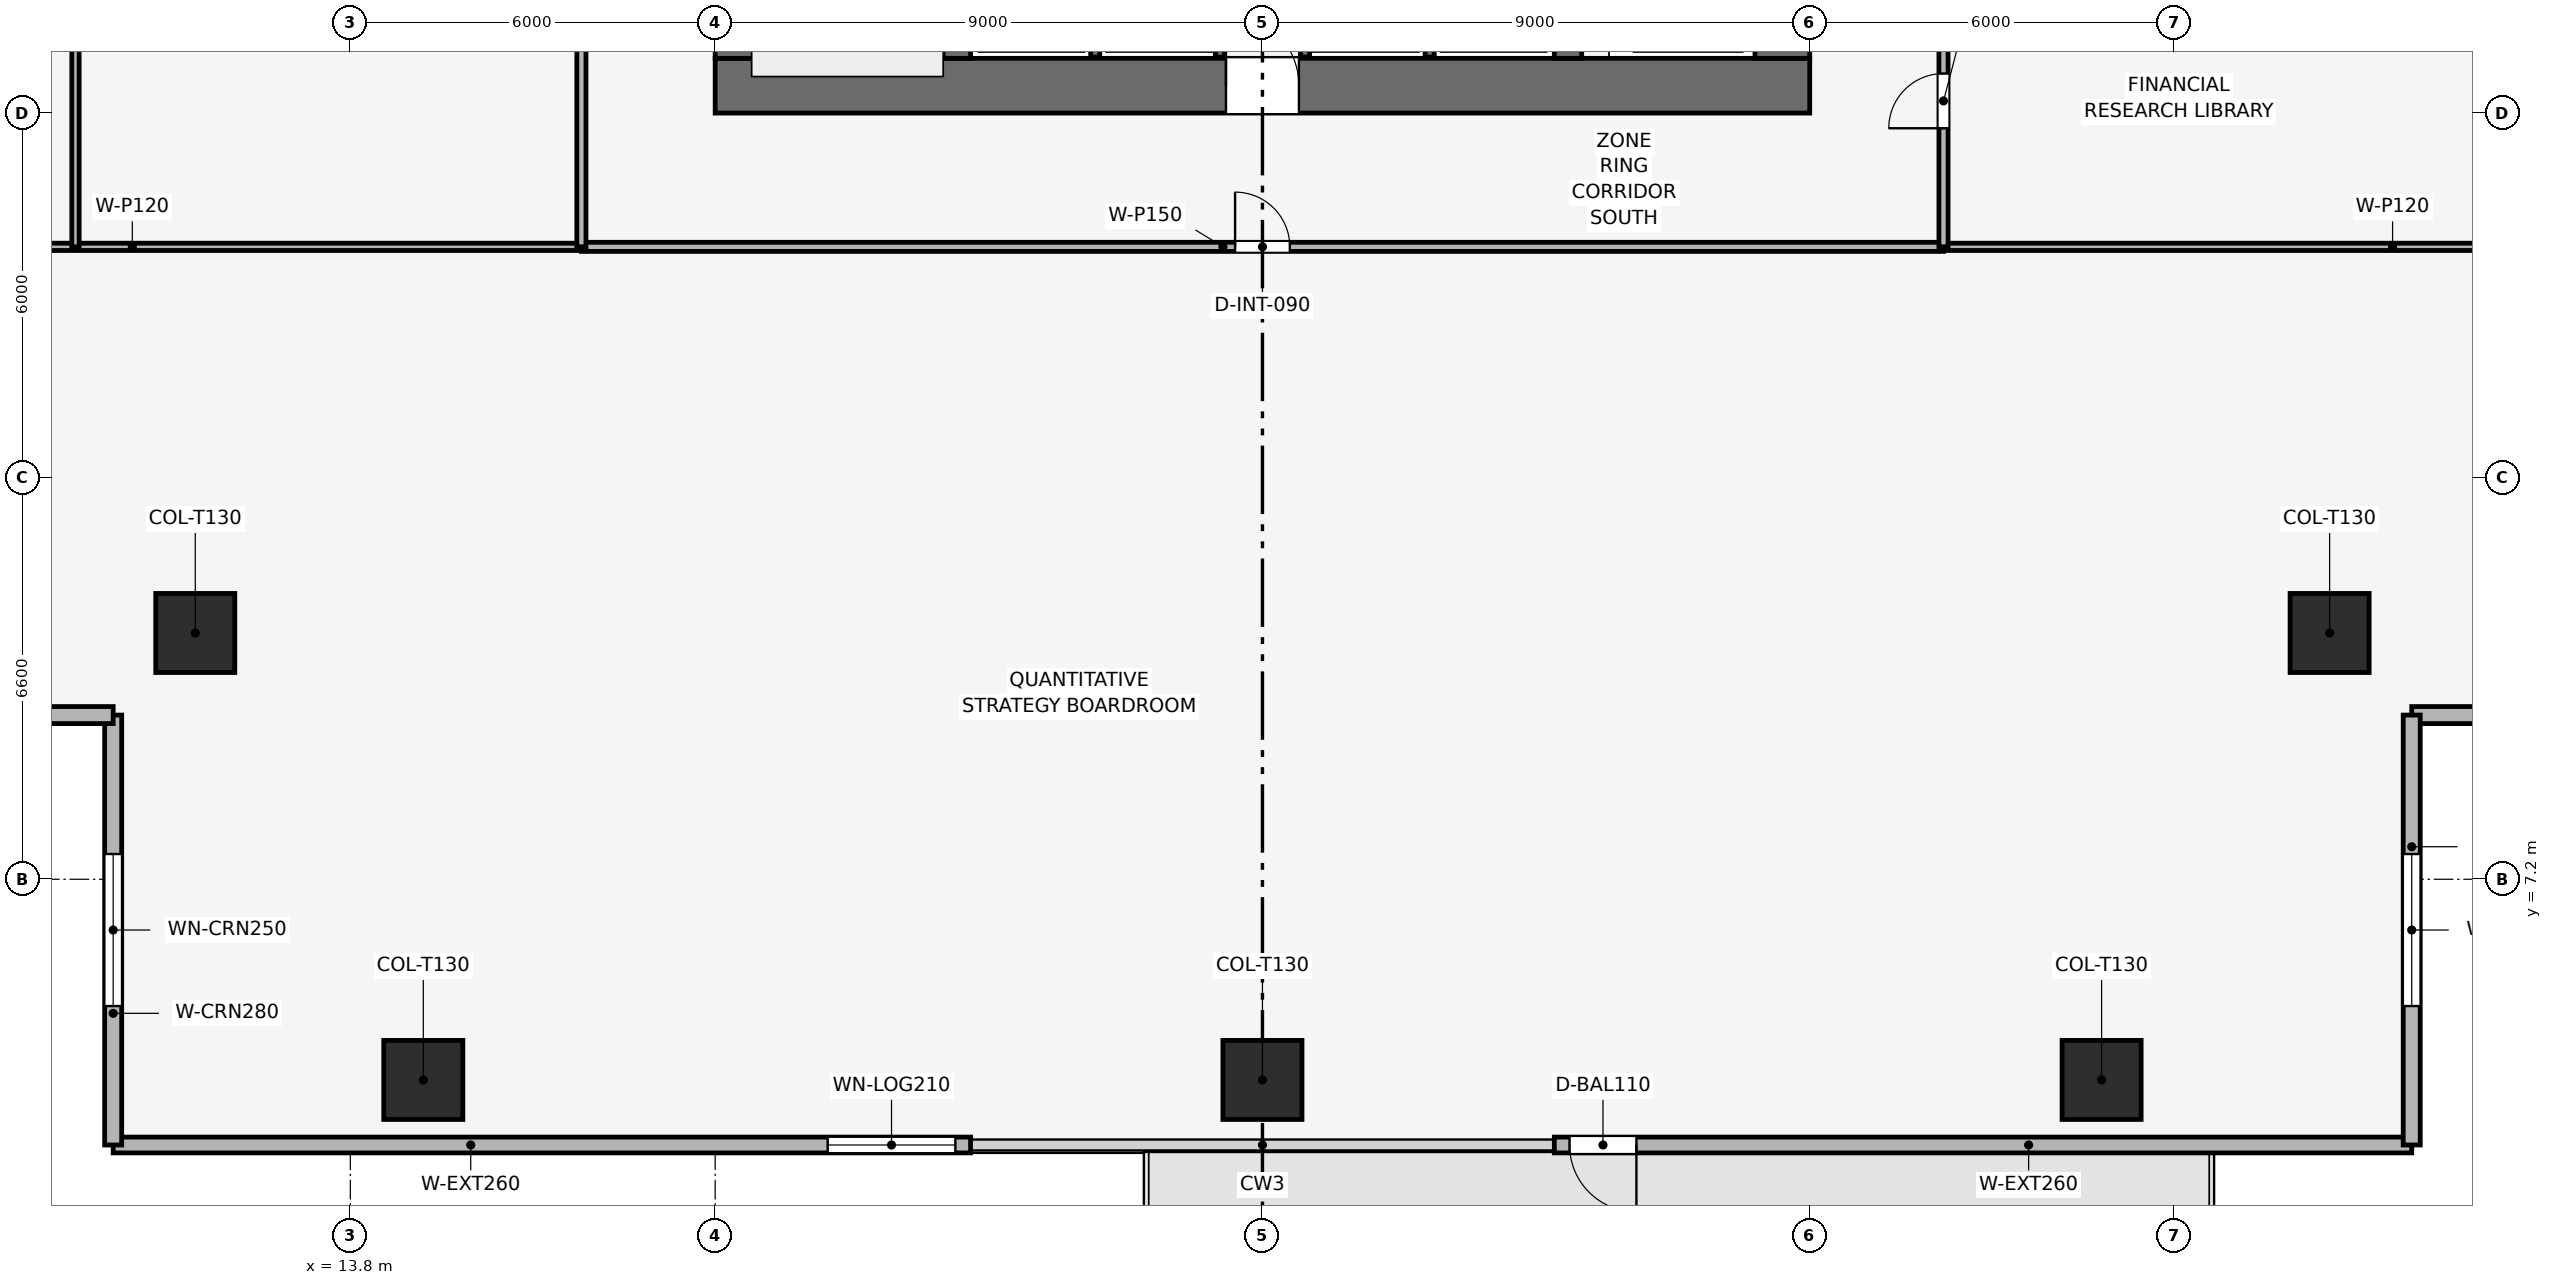
"""IFC4 building model, lengths in metres.
Left out: names, types, materials, properties, quantities, classifications, styles, units other than length and angle.
Written with IfcOpenShell. Run it as: python <this file> out.ifc"""

import sys

from ifc_helpers import new_model, si_unit, direction, frame, frame_2d, origin, origin_2d, place, context, subcontext, project, spatial, rectangle, extrude, element, fill, save


model = new_model("IFC4")
c1 = context("Model", 3, precision=1e-05, world=origin(), true_north=direction((0.0, 1.0)))
c2 = subcontext(c1, "Body", "Model", "MODEL_VIEW")
j1 = project(units=[si_unit("LENGTHUNIT", "METRE"), si_unit("PLANEANGLEUNIT", "RADIAN")], contexts=[c1])
p1 = place(None, origin())
s1 = spatial("IfcSite", under=j1, at=p1, CompositionType="ELEMENT")
p2 = place(p1, origin())
s2 = spatial("IfcBuilding", under=s1, at=p2, CompositionType="ELEMENT")
p3 = place(p2, frame((0.0, 0.0, 129.0)))
s3 = spatial("IfcBuildingStorey", under=s2, at=p3, CompositionType="ELEMENT", Elevation=129.0)
p4 = place(p3, frame((19.8, 20.25, 0.0), z_axis=(0.0, 0.0, 1.0), x_axis=(1.0, 0.0, 0.0)))
e1 = element("IfcWall", 1, at=p4, inside=s3, PredefinedType="SHEAR", context=c2, shape_type="SweptSolid", body=[
    extrude(rectangle(XDim=18.0, YDim=0.9, at=frame_2d((9.0, 0.0))), origin(), (0.0, 0.0, 1.0), 3.9),
])
p5 = place(p4, frame((8.4, 0.0, 0.0)))
e2 = element("IfcOpeningElement", 2, at=p5, cuts=e1, PredefinedType="OPENING", context=c2, shape_type="SweptSolid", body=[
    extrude(rectangle(XDim=1.2, YDim=2.2, at=frame_2d((0.6, 1.1))), frame((0.0, 0.46, 0.0), z_axis=(0.0, -1.0, 0.0), x_axis=(1.0, 0.0, 0.0)), (0.0, 0.0, 1.0), 0.92),
])
p6 = place(p3, frame((20.25, 20.7, 0.0), z_axis=(0.0, 0.0, 1.0), x_axis=(0.0, 1.0, 0.0)))
e3 = element("IfcWall", 3, at=p6, inside=s3, PredefinedType="SHEAR", context=c2, shape_type="SweptSolid", body=[
    extrude(rectangle(XDim=16.2, YDim=0.9, at=frame_2d((8.1, 0.0))), origin(), (0.0, 0.0, 1.0), 3.9),
])
p7 = place(p6, frame((10.1, 0.0, 0.0)))
e4 = element("IfcOpeningElement", 4, at=p7, cuts=e3, PredefinedType="OPENING", context=c2, shape_type="SweptSolid", body=[
    extrude(rectangle(XDim=1.1, YDim=2.15, at=frame_2d((0.55, 1.075))), frame((0.0, 0.46, 0.0), z_axis=(0.0, -1.0, 0.0), x_axis=(1.0, 0.0, 0.0)), (0.0, 0.0, 1.0), 0.92),
])
p8 = place(p3, frame((37.35, 20.7, 0.0), z_axis=(0.0, 0.0, 1.0), x_axis=(0.0, 1.0, 0.0)))
e5 = element("IfcWall", 5, at=p8, inside=s3, PredefinedType="SHEAR", context=c2, shape_type="SweptSolid", body=[
    extrude(rectangle(XDim=16.2, YDim=0.9, at=frame_2d((8.1, 0.0))), origin(), (0.0, 0.0, 1.0), 3.9),
])
p9 = place(p8, frame((4.6, 0.0, 0.0)))
e6 = element("IfcOpeningElement", 6, at=p9, cuts=e5, PredefinedType="OPENING", context=c2, shape_type="SweptSolid", body=[
    extrude(rectangle(XDim=1.1, YDim=2.15, at=frame_2d((0.55, 1.075))), frame((0.0, 0.46, 0.0), z_axis=(0.0, -1.0, 0.0), x_axis=(1.0, 0.0, 0.0)), (0.0, 0.0, 1.0), 0.92),
])
for number, where, z_axis, x_axis in (
    (7, (23.775, 20.7, 0.0), (0.0, 0.0, 1.0), (0.0, 1.0, 0.0)),
    (8, (33.825, 20.7, 0.0), (0.0, 0.0, 1.0), (0.0, 1.0, 0.0)),
):
    element("IfcWall", number, at=place(p3, frame(where, z_axis=z_axis, x_axis=x_axis)), inside=s3, PredefinedType="SHEAR", context=c2, shape_type="SweptSolid", body=[
        extrude(rectangle(XDim=16.2, YDim=0.45, at=frame_2d((8.1, 0.0))), origin(), (0.0, 0.0, 1.0), 3.9),
    ])
for number, where, z_axis, x_axis in (
    (9, (15.0, 3.9, 0.003), (0.0, 0.0, 1.0), (1.0, 0.0, 0.0)),
    (10, (28.8, 3.9, 0.003), (0.0, 0.0, 1.0), (1.0, 0.0, 0.0)),
    (11, (42.6, 3.9, 0.003), (0.0, 0.0, 1.0), (1.0, 0.0, 0.0)),
    (12, (11.25, 11.25, 0.003), (0.0, 0.0, 1.0), (1.0, 0.0, 0.0)),
    (13, (46.35, 11.25, 0.003), (0.0, 0.0, 1.0), (1.0, 0.0, 0.0)),
):
    element("IfcColumn", number, at=place(p3, frame(where, z_axis=z_axis, x_axis=x_axis)), inside=s3, PredefinedType="COLUMN", context=c2, shape_type="SweptSolid", body=[
        extrude(rectangle(XDim=1.3, YDim=1.3, at=origin_2d()), origin(), (0.0, 0.0, 1.0), 3.644),
    ])
p10 = place(p3, frame((47.7, 2.83, 0.0), z_axis=(0.0, 0.0, 1.0), x_axis=(-1.0, 0.0, 0.0)))
e14 = element("IfcWall", 14, at=p10, inside=s3, PredefinedType="SOLIDWALL", context=c2, shape_type="SweptSolid", body=[
    extrude(rectangle(XDim=14.1, YDim=0.26, at=frame_2d((7.05, 0.0))), origin(), (0.0, 0.0, 1.0), 3.65),
])
p11 = place(p10, frame((12.75, 0.0, 0.0)))
e15 = element("IfcOpeningElement", 15, at=p11, cuts=e14, PredefinedType="OPENING", context=c2, shape_type="SweptSolid", body=[
    extrude(rectangle(XDim=1.1, YDim=2.2, at=frame_2d((0.55, 1.1))), frame((0.0, 0.14, 0.0), z_axis=(0.0, -1.0, 0.0), x_axis=(1.0, 0.0, 0.0)), (0.0, 0.0, 1.0), 0.28),
])
p12 = place(p3, frame((24.0, 2.83, 0.0), z_axis=(0.0, 0.0, 1.0), x_axis=(-1.0, 0.0, 0.0)))
e16 = element("IfcWall", 16, at=p12, inside=s3, PredefinedType="SOLIDWALL", context=c2, shape_type="SweptSolid", body=[
    extrude(rectangle(XDim=14.1, YDim=0.26, at=frame_2d((7.05, 0.0))), origin(), (0.0, 0.0, 1.0), 3.65),
])
p13 = place(p12, frame((0.25, 0.0, 0.72)))
e17 = element("IfcOpeningElement", 17, at=p13, cuts=e16, PredefinedType="OPENING", context=c2, shape_type="SweptSolid", body=[
    extrude(rectangle(XDim=2.1, YDim=2.1, at=frame_2d((1.05, 1.05))), frame((0.0, 0.14, 0.0), z_axis=(0.0, -1.0, 0.0), x_axis=(1.0, 0.0, 0.0)), (0.0, 0.0, 1.0), 0.28),
])
p14 = place(p3, frame((9.9, 2.83, 0.0), z_axis=(0.0, 0.0, 1.0), x_axis=(0.0, 1.0, 0.0)))
e18 = element("IfcWall", 18, at=p14, inside=s3, PredefinedType="SOLIDWALL", context=c2, shape_type="SweptSolid", body=[
    extrude(rectangle(XDim=7.07, YDim=0.28, at=frame_2d((3.535, 0.0))), origin(), (0.0, 0.0, 1.0), 3.65),
])
p15 = place(p14, frame((2.285, 0.0, 0.72)))
e19 = element("IfcOpeningElement", 19, at=p15, cuts=e18, PredefinedType="OPENING", context=c2, shape_type="SweptSolid", body=[
    extrude(rectangle(XDim=2.5, YDim=1.9, at=frame_2d((1.25, 0.95))), frame((0.0, 0.15, 0.0), z_axis=(0.0, -1.0, 0.0), x_axis=(1.0, 0.0, 0.0)), (0.0, 0.0, 1.0), 0.3),
])
p16 = place(p3, frame((9.9, 9.9, 0.0), z_axis=(0.0, 0.0, 1.0), x_axis=(-1.0, 0.0, 0.0)))
e20 = element("IfcWall", 20, at=p16, inside=s3, PredefinedType="SOLIDWALL", context=c2, shape_type="SweptSolid", body=[
    extrude(rectangle(XDim=7.07, YDim=0.28, at=frame_2d((3.535, 0.0))), origin(), (0.0, 0.0, 1.0), 3.65),
])
p17 = place(p16, frame((2.285, 0.0, 0.72)))
e21 = element("IfcOpeningElement", 21, at=p17, cuts=e20, PredefinedType="OPENING", context=c2, shape_type="SweptSolid", body=[
    extrude(rectangle(XDim=2.5, YDim=1.9, at=frame_2d((1.25, 0.95))), frame((0.0, 0.15, 0.0), z_axis=(0.0, -1.0, 0.0), x_axis=(1.0, 0.0, 0.0)), (0.0, 0.0, 1.0), 0.3),
])
p18 = place(p3, frame((54.77, 9.9, 0.0), z_axis=(0.0, 0.0, 1.0), x_axis=(-1.0, 0.0, 0.0)))
e22 = element("IfcWall", 22, at=p18, inside=s3, PredefinedType="SOLIDWALL", context=c2, shape_type="SweptSolid", body=[
    extrude(rectangle(XDim=7.07, YDim=0.28, at=frame_2d((3.535, 0.0))), origin(), (0.0, 0.0, 1.0), 3.65),
])
p19 = place(p18, frame((2.285, 0.0, 0.72)))
e23 = element("IfcOpeningElement", 23, at=p19, cuts=e22, PredefinedType="OPENING", context=c2, shape_type="SweptSolid", body=[
    extrude(rectangle(XDim=2.5, YDim=1.9, at=frame_2d((1.25, 0.95))), frame((0.0, 0.15, 0.0), z_axis=(0.0, -1.0, 0.0), x_axis=(1.0, 0.0, 0.0)), (0.0, 0.0, 1.0), 0.3),
])
p20 = place(p3, frame((47.7, 9.9, 0.0), z_axis=(0.0, 0.0, 1.0), x_axis=(0.0, -1.0, 0.0)))
e24 = element("IfcWall", 24, at=p20, inside=s3, PredefinedType="SOLIDWALL", context=c2, shape_type="SweptSolid", body=[
    extrude(rectangle(XDim=7.07, YDim=0.28, at=frame_2d((3.535, 0.0))), origin(), (0.0, 0.0, 1.0), 3.65),
])
p21 = place(p20, frame((2.285, 0.0, 0.72)))
e25 = element("IfcOpeningElement", 25, at=p21, cuts=e24, PredefinedType="OPENING", context=c2, shape_type="SweptSolid", body=[
    extrude(rectangle(XDim=2.5, YDim=1.9, at=frame_2d((1.25, 0.95))), frame((0.0, 0.15, 0.0), z_axis=(0.0, -1.0, 0.0), x_axis=(1.0, 0.0, 0.0)), (0.0, 0.0, 1.0), 0.3),
])
for number, where, z_axis, x_axis in (
    (26, (26.05, 20.72, 0.0), (0.0, 0.0, 1.0), (0.0, 1.0, 0.0)),
    (27, (28.1, 20.72, 0.0), (0.0, 0.0, 1.0), (0.0, 1.0, 0.0)),
    (28, (29.5, 20.72, 0.0), (0.0, 0.0, 1.0), (0.0, 1.0, 0.0)),
    (29, (31.55, 20.72, 0.0), (0.0, 0.0, 1.0), (0.0, 1.0, 0.0)),
):
    element("IfcWall", number, at=place(p3, frame(where, z_axis=z_axis, x_axis=x_axis)), inside=s3, PredefinedType="SHEAR", context=c2, shape_type="SweptSolid", body=[
        extrude(rectangle(XDim=2.26, YDim=0.15, at=frame_2d((1.13, 0.0))), origin(), (0.0, 0.0, 1.0), 3.65),
    ])
for number, where, z_axis, x_axis in (
    (30, (2.83, 17.6, 0.0), (0.0, 0.0, 1.0), (1.0, 0.0, 0.0)),
    (31, (40.0, 17.6, 0.0), (0.0, 0.0, 1.0), (1.0, 0.0, 0.0)),
):
    element("IfcWall", number, at=place(p3, frame(where, z_axis=z_axis, x_axis=x_axis)), inside=s3, PredefinedType="PARTITIONING", context=c2, shape_type="SweptSolid", body=[
        extrude(rectangle(XDim=14.77, YDim=0.12, at=frame_2d((7.385, 0.0))), origin(), (0.0, 0.0, 1.0), 2.835),
    ])
p22 = place(p3, frame((9.28, 17.6, 0.0), z_axis=(0.0, 0.0, 1.0), x_axis=(0.0, 1.0, 0.0)))
e32 = element("IfcWall", 32, at=p22, inside=s3, PredefinedType="PARTITIONING", context=c2, shape_type="SweptSolid", body=[
    extrude(rectangle(XDim=22.4, YDim=0.12, at=frame_2d((11.2, 0.0))), origin(), (0.0, 0.0, 1.0), 3.185),
])
p23 = place(p22, frame((17.783, 0.0, 0.0)))
e33 = element("IfcOpeningElement", 33, at=p23, cuts=e32, PredefinedType="OPENING", context=c2, shape_type="SweptSolid", body=[
    extrude(rectangle(XDim=0.9, YDim=2.1, at=frame_2d((0.45, 1.05))), frame((0.0, 0.07, 0.0), z_axis=(0.0, -1.0, 0.0), x_axis=(1.0, 0.0, 0.0)), (0.0, 0.0, 1.0), 0.14),
])
p24 = place(p3, frame((17.6, 17.6, 0.0), z_axis=(0.0, 0.0, 1.0), x_axis=(1.0, 0.0, 0.0)))
e34 = element("IfcWall", 34, at=p24, inside=s3, PredefinedType="PARTITIONING", context=c2, shape_type="SweptSolid", body=[
    extrude(rectangle(XDim=22.4, YDim=0.15, at=frame_2d((11.2, 0.0))), origin(), (0.0, 0.0, 1.0), 3.185),
])
p25 = place(p24, frame((10.75, 0.0, 0.0)))
e35 = element("IfcOpeningElement", 35, at=p25, cuts=e34, PredefinedType="OPENING", context=c2, shape_type="SweptSolid", body=[
    extrude(rectangle(XDim=0.9, YDim=2.1, at=frame_2d((0.45, 1.05))), frame((0.0, 0.085, 0.0), z_axis=(0.0, -1.0, 0.0), x_axis=(1.0, 0.0, 0.0)), (0.0, 0.0, 1.0), 0.17),
])
p26 = place(p3, frame((17.6, 17.6, 0.0), z_axis=(0.0, 0.0, 1.0), x_axis=(0.0, 1.0, 0.0)))
e36 = element("IfcWall", 36, at=p26, inside=s3, PredefinedType="PARTITIONING", context=c2, shape_type="SweptSolid", body=[
    extrude(rectangle(XDim=22.4, YDim=0.15, at=frame_2d((11.2, 0.0))), origin(), (0.0, 0.0, 1.0), 3.185),
])
p27 = place(p26, frame((10.75, 0.0, 0.0)))
e37 = element("IfcOpeningElement", 37, at=p27, cuts=e36, PredefinedType="OPENING", context=c2, shape_type="SweptSolid", body=[
    extrude(rectangle(XDim=0.9, YDim=2.1, at=frame_2d((0.45, 1.05))), frame((0.0, 0.085, 0.0), z_axis=(0.0, -1.0, 0.0), x_axis=(1.0, 0.0, 0.0)), (0.0, 0.0, 1.0), 0.17),
])
p28 = place(p3, frame((40.0, 17.6, 0.0), z_axis=(0.0, 0.0, 1.0), x_axis=(0.0, 1.0, 0.0)))
e38 = element("IfcWall", 38, at=p28, inside=s3, PredefinedType="PARTITIONING", context=c2, shape_type="SweptSolid", body=[
    extrude(rectangle(XDim=22.4, YDim=0.15, at=frame_2d((11.2, 0.0))), origin(), (0.0, 0.0, 1.0), 3.185),
])
p29 = place(p28, frame((1.95, 0.0, 0.0)))
e39 = element("IfcOpeningElement", 39, at=p29, cuts=e38, PredefinedType="OPENING", context=c2, shape_type="SweptSolid", body=[
    extrude(rectangle(XDim=0.9, YDim=2.1, at=frame_2d((0.45, 1.05))), frame((0.0, 0.085, 0.0), z_axis=(0.0, -1.0, 0.0), x_axis=(1.0, 0.0, 0.0)), (0.0, 0.0, 1.0), 0.17),
])
p30 = place(p28, frame((5.75, 0.0, 0.0)))
e40 = element("IfcOpeningElement", 40, at=p30, cuts=e38, PredefinedType="OPENING", context=c2, shape_type="SweptSolid", body=[
    extrude(rectangle(XDim=0.9, YDim=2.1, at=frame_2d((0.45, 1.05))), frame((0.0, 0.085, 0.0), z_axis=(0.0, -1.0, 0.0), x_axis=(1.0, 0.0, 0.0)), (0.0, 0.0, 1.0), 0.17),
])
p31 = place(p28, frame((8.65, 0.0, 0.0)))
e41 = element("IfcOpeningElement", 41, at=p31, cuts=e38, PredefinedType="OPENING", context=c2, shape_type="SweptSolid", body=[
    extrude(rectangle(XDim=0.9, YDim=2.1, at=frame_2d((0.45, 1.05))), frame((0.0, 0.085, 0.0), z_axis=(0.0, -1.0, 0.0), x_axis=(1.0, 0.0, 0.0)), (0.0, 0.0, 1.0), 0.17),
])
p32 = place(p28, frame((11.4, 0.0, 0.0)))
e42 = element("IfcOpeningElement", 42, at=p32, cuts=e38, PredefinedType="OPENING", context=c2, shape_type="SweptSolid", body=[
    extrude(rectangle(XDim=0.95, YDim=2.1, at=frame_2d((0.475, 1.05))), frame((0.0, 0.085, 0.0), z_axis=(0.0, -1.0, 0.0), x_axis=(1.0, 0.0, 0.0)), (0.0, 0.0, 1.0), 0.17),
])
p33 = place(p28, frame((17.35, 0.0, 0.0)))
e43 = element("IfcOpeningElement", 43, at=p33, cuts=e38, PredefinedType="OPENING", context=c2, shape_type="SweptSolid", body=[
    extrude(rectangle(XDim=0.9, YDim=2.1, at=frame_2d((0.45, 1.05))), frame((0.0, 0.085, 0.0), z_axis=(0.0, -1.0, 0.0), x_axis=(1.0, 0.0, 0.0)), (0.0, 0.0, 1.0), 0.17),
])
p34 = place(p11, origin())
e44 = element("IfcDoor", 44, at=p34, inside=s3, OperationType="SINGLE_SWING_LEFT", PredefinedType="DOOR", context=c2, shape_type="SweptSolid", body=[
    extrude(rectangle(XDim=1.1, YDim=2.2, at=frame_2d((0.55, 1.1))), frame((0.0, 0.025, 0.0), z_axis=(0.0, -1.0, 0.0), x_axis=(1.0, 0.0, 0.0)), (0.0, 0.0, 1.0), 0.05),
])
fill(e15, e44)
p35 = place(p13, origin())
e45 = element("IfcWindow", 45, at=p35, inside=s3, PartitioningType="SINGLE_PANEL", PredefinedType="WINDOW", context=c2, shape_type="SweptSolid", body=[
    extrude(rectangle(XDim=2.1, YDim=2.1, at=frame_2d((1.05, 1.05))), frame((0.0, 0.03, 0.0), z_axis=(0.0, -1.0, 0.0), x_axis=(1.0, 0.0, 0.0)), (0.0, 0.0, 1.0), 0.06),
])
fill(e17, e45)
p36 = place(p15, origin())
e46 = element("IfcWindow", 46, at=p36, inside=s3, PartitioningType="SINGLE_PANEL", PredefinedType="WINDOW", context=c2, shape_type="SweptSolid", body=[
    extrude(rectangle(XDim=2.5, YDim=1.9, at=frame_2d((1.25, 0.95))), frame((0.0, 0.03, 0.0), z_axis=(0.0, -1.0, 0.0), x_axis=(1.0, 0.0, 0.0)), (0.0, 0.0, 1.0), 0.06),
])
fill(e19, e46)
p37 = place(p21, origin())
e47 = element("IfcWindow", 47, at=p37, inside=s3, PartitioningType="SINGLE_PANEL", PredefinedType="WINDOW", context=c2, shape_type="SweptSolid", body=[
    extrude(rectangle(XDim=2.5, YDim=1.9, at=frame_2d((1.25, 0.95))), frame((0.0, 0.03, 0.0), z_axis=(0.0, -1.0, 0.0), x_axis=(1.0, 0.0, 0.0)), (0.0, 0.0, 1.0), 0.06),
])
fill(e25, e47)
p38 = place(p25, origin())
e48 = element("IfcDoor", 48, at=p38, inside=s3, OperationType="SINGLE_SWING_LEFT", PredefinedType="DOOR", context=c2, shape_type="SweptSolid", body=[
    extrude(rectangle(XDim=0.9, YDim=2.1, at=frame_2d((0.45, 1.05))), frame((0.0, 0.025, 0.0), z_axis=(0.0, -1.0, 0.0), x_axis=(1.0, 0.0, 0.0)), (0.0, 0.0, 1.0), 0.05),
])
fill(e35, e48)
p39 = place(p29, origin())
e49 = element("IfcDoor", 49, at=p39, inside=s3, OperationType="SINGLE_SWING_LEFT", PredefinedType="DOOR", context=c2, shape_type="SweptSolid", body=[
    extrude(rectangle(XDim=0.9, YDim=2.1, at=frame_2d((0.45, 1.05))), frame((0.0, 0.025, 0.0), z_axis=(0.0, -1.0, 0.0), x_axis=(1.0, 0.0, 0.0)), (0.0, 0.0, 1.0), 0.05),
])
fill(e39, e49)
p40 = place(p5, origin())
e50 = element("IfcDoor", 50, at=p40, inside=s3, OperationType="SINGLE_SWING_LEFT", PredefinedType="DOOR", context=c2, shape_type="SweptSolid", body=[
    extrude(rectangle(XDim=1.2, YDim=2.2, at=frame_2d((0.6, 1.1))), frame((0.0, 0.025, 0.0), z_axis=(0.0, -1.0, 0.0), x_axis=(1.0, 0.0, 0.0)), (0.0, 0.0, 1.0), 0.05),
])
fill(e2, e50)
save(model, sys.argv[1])
